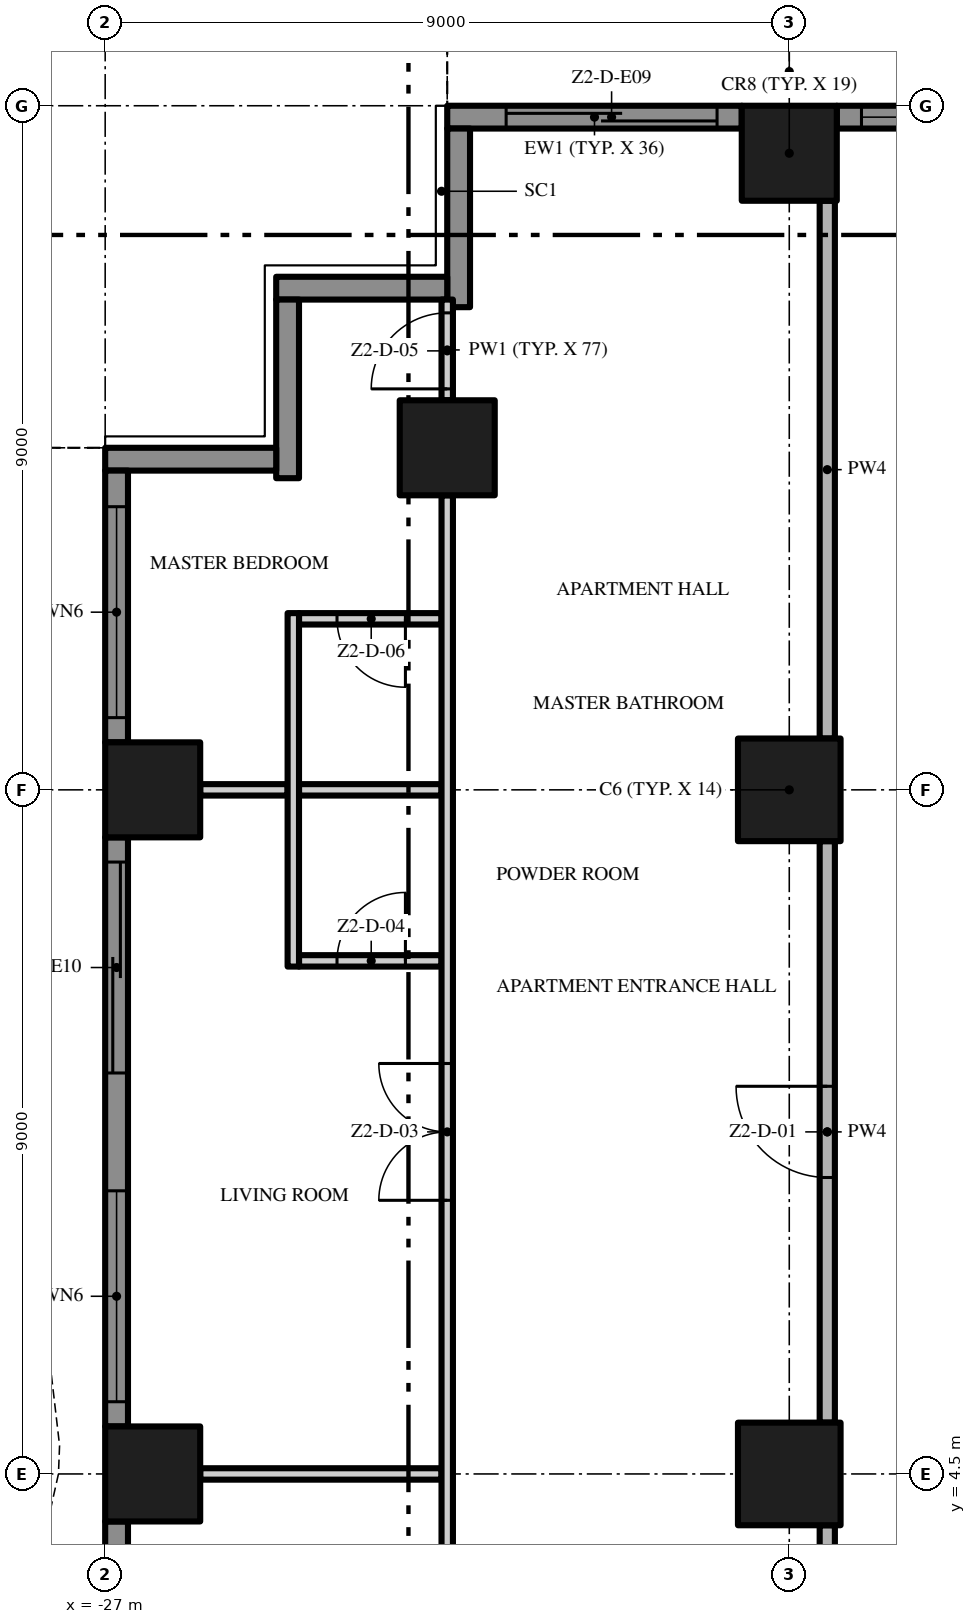
"""IFC4 building model, lengths in metres.
Left out: names, types, materials, properties, quantities, classifications, styles, units other than length and angle.
Written with IfcOpenShell. Run it as: python <this file> out.ifc"""

import sys

from ifc_helpers import new_model, si_unit, direction, frame, frame_2d, origin, origin_2d, place, context, subcontext, project, spatial, polyline, rectangle, outline, extrude, element, fill, save


model = new_model("IFC4")
c1 = context("Model", 3, precision=1e-05, world=origin(), true_north=direction((0.0, 1.0)))
c2 = subcontext(c1, "Body", "Model", "MODEL_VIEW")
j1 = project(units=[si_unit("LENGTHUNIT", "METRE"), si_unit("PLANEANGLEUNIT", "RADIAN")], contexts=[c1])
p1 = place(None, origin())
s1 = spatial("IfcSite", under=j1, at=p1, CompositionType="ELEMENT")
p2 = place(p1, origin())
s2 = spatial("IfcBuilding", under=s1, at=p2, CompositionType="ELEMENT")
p3 = place(p2, frame((0.0, 0.0, 103.6)))
s3 = spatial("IfcBuildingStorey", under=s2, at=p3, CompositionType="ELEMENT", Elevation=103.6)
p4 = place(p3, frame((-18.0, 13.5, 0.0), z_axis=(0.0, 0.0, 1.0), x_axis=(1.0, 0.0, 0.0)))
e1 = element("IfcColumn", 1, at=p4, inside=s3, PredefinedType="COLUMN", context=c2, shape_type="SweptSolid", body=[
    extrude(rectangle(XDim=1.35, YDim=1.35, at=origin_2d()), origin(), (0.0, 0.0, 1.0), 3.5),
])
p5 = place(p3, frame((-18.0, 21.875, 0.0), z_axis=(0.0, 0.0, 1.0), x_axis=(1.0, 0.0, 0.0)))
e2 = element("IfcColumn", 2, at=p5, inside=s3, PredefinedType="COLUMN", context=c2, shape_type="SweptSolid", body=[
    extrude(rectangle(XDim=1.25, YDim=1.25, at=origin_2d()), origin(), (0.0, 0.0, 1.0), 3.5),
])
p6 = place(p3, frame((-18.0, 4.5, 0.0), z_axis=(0.0, 0.0, 1.0), x_axis=(1.0, 0.0, 0.0)))
e3 = element("IfcColumn", 3, at=p6, inside=s3, PredefinedType="COLUMN", context=c2, shape_type="SweptSolid", body=[
    extrude(rectangle(XDim=1.35, YDim=1.35, at=origin_2d()), origin(), (0.0, 0.0, 1.0), 3.5),
])
for number, where, z_axis, x_axis in (
    (4, (-26.375, 13.5, 0.0), (0.0, 0.0, 1.0), (1.0, 0.0, 0.0)),
    (5, (-22.5, 18.0, 0.0), (0.0, 0.0, 1.0), (1.0, 0.0, 0.0)),
    (6, (-26.375, 4.5, 0.0), (0.0, 0.0, 1.0), (1.0, 0.0, 0.0)),
):
    element("IfcColumn", number, at=place(p3, frame(where, z_axis=z_axis, x_axis=x_axis)), inside=s3, PredefinedType="COLUMN", context=c2, shape_type="SweptSolid", body=[
        extrude(rectangle(XDim=1.25, YDim=1.25, at=origin_2d()), origin(), (0.0, 0.0, 1.0), 3.5),
    ])
p7 = place(p3, frame((-17.375, 22.35, 0.0), z_axis=(0.0, 0.0, 1.0), x_axis=(1.0, 0.0, 0.0)))
e7 = element("IfcWall", 7, at=p7, inside=s3, PredefinedType="SOLIDWALL", context=c2, shape_type="SweptSolid", body=[
    extrude(rectangle(XDim=3.875, YDim=0.3, at=frame_2d((1.938, 0.0))), origin(), (0.0, 0.0, 1.0), 3.5),
])
p8 = place(p7, frame((0.325, 0.0, 0.45)))
e8 = element("IfcOpeningElement", 8, at=p8, cuts=e7, PredefinedType="OPENING", context=c2, shape_type="SweptSolid", body=[
    extrude(rectangle(XDim=2.775, YDim=2.65, at=frame_2d((1.387, 1.325))), frame((0.0, 0.16, 0.0), z_axis=(0.0, -1.0, 0.0), x_axis=(1.0, 0.0, 0.0)), (0.0, 0.0, 1.0), 0.32),
])
p9 = place(p3, frame((-22.5, 22.35, 0.0), z_axis=(0.0, 0.0, 1.0), x_axis=(1.0, 0.0, 0.0)))
e9 = element("IfcWall", 9, at=p9, inside=s3, PredefinedType="SOLIDWALL", context=c2, shape_type="SweptSolid", body=[
    extrude(rectangle(XDim=3.875, YDim=0.3, at=frame_2d((1.938, 0.0))), origin(), (0.0, 0.0, 1.0), 3.5),
])
p10 = place(p9, frame((0.775, 0.0, 0.0)))
e10 = element("IfcOpeningElement", 10, at=p10, cuts=e9, PredefinedType="OPENING", context=c2, shape_type="SweptSolid", body=[
    extrude(rectangle(XDim=2.775, YDim=2.4, at=frame_2d((1.387, 1.2))), frame((0.0, 0.16, 0.0), z_axis=(0.0, -1.0, 0.0), x_axis=(1.0, 0.0, 0.0)), (0.0, 0.0, 1.0), 0.32),
])
p11 = place(p3, frame((-22.35, 19.85, 0.0), z_axis=(0.0, 0.0, 1.0), x_axis=(0.0, 1.0, 0.0)))
e11 = element("IfcWall", 11, at=p11, inside=s3, PredefinedType="SOLIDWALL", context=c2, shape_type="SweptSolid", body=[
    extrude(rectangle(XDim=2.35, YDim=0.3, at=frame_2d((1.175, 0.0))), origin(), (0.0, 0.0, 1.0), 3.5),
])
p12 = place(p3, frame((-24.75, 20.1, 0.0), z_axis=(0.0, 0.0, 1.0), x_axis=(1.0, 0.0, 0.0)))
e12 = element("IfcWall", 12, at=p12, inside=s3, PredefinedType="SOLIDWALL", context=c2, shape_type="SweptSolid", body=[
    extrude(rectangle(XDim=2.25, YDim=0.3, at=frame_2d((1.125, 0.0))), origin(), (0.0, 0.0, 1.0), 3.5),
])
p13 = place(p3, frame((-24.6, 17.6, 0.0), z_axis=(0.0, 0.0, 1.0), x_axis=(0.0, 1.0, 0.0)))
e13 = element("IfcWall", 13, at=p13, inside=s3, PredefinedType="SOLIDWALL", context=c2, shape_type="SweptSolid", body=[
    extrude(rectangle(XDim=2.35, YDim=0.3, at=frame_2d((1.175, 0.0))), origin(), (0.0, 0.0, 1.0), 3.5),
])
p14 = place(p3, frame((-27.0, 17.85, 0.0), z_axis=(0.0, 0.0, 1.0), x_axis=(1.0, 0.0, 0.0)))
e14 = element("IfcWall", 14, at=p14, inside=s3, PredefinedType="SOLIDWALL", context=c2, shape_type="SweptSolid", body=[
    extrude(rectangle(XDim=2.25, YDim=0.3, at=frame_2d((1.125, 0.0))), origin(), (0.0, 0.0, 1.0), 3.5),
])
p15 = place(p3, frame((-26.85, 14.125, 0.0), z_axis=(0.0, 0.0, 1.0), x_axis=(0.0, 1.0, 0.0)))
e15 = element("IfcWall", 15, at=p15, inside=s3, PredefinedType="SOLIDWALL", context=c2, shape_type="SweptSolid", body=[
    extrude(rectangle(XDim=3.575, YDim=0.3, at=frame_2d((1.788, 0.0))), origin(), (0.0, 0.0, 1.0), 3.5),
])
p16 = place(p15, frame((0.325, 0.0, 0.45)))
e16 = element("IfcOpeningElement", 16, at=p16, cuts=e15, PredefinedType="OPENING", context=c2, shape_type="SweptSolid", body=[
    extrude(rectangle(XDim=2.775, YDim=2.65, at=frame_2d((1.387, 1.325))), frame((0.0, 0.16, 0.0), z_axis=(0.0, -1.0, 0.0), x_axis=(1.0, 0.0, 0.0)), (0.0, 0.0, 1.0), 0.32),
])
p17 = place(p3, frame((-26.85, 5.125, 0.0), z_axis=(0.0, 0.0, 1.0), x_axis=(0.0, 1.0, 0.0)))
e17 = element("IfcWall", 17, at=p17, inside=s3, PredefinedType="SOLIDWALL", context=c2, shape_type="SweptSolid", body=[
    extrude(rectangle(XDim=7.75, YDim=0.3, at=frame_2d((3.875, 0.0))), origin(), (0.0, 0.0, 1.0), 3.5),
])
p18 = place(p17, frame((4.65, 0.0, 0.0)))
e18 = element("IfcOpeningElement", 18, at=p18, cuts=e17, PredefinedType="OPENING", context=c2, shape_type="SweptSolid", body=[
    extrude(rectangle(XDim=2.775, YDim=2.4, at=frame_2d((1.387, 1.2))), frame((0.0, 0.16, 0.0), z_axis=(0.0, -1.0, 0.0), x_axis=(1.0, 0.0, 0.0)), (0.0, 0.0, 1.0), 0.32),
])
p19 = place(p17, frame((0.325, 0.0, 0.45)))
e19 = element("IfcOpeningElement", 19, at=p19, cuts=e17, PredefinedType="OPENING", context=c2, shape_type="SweptSolid", body=[
    extrude(rectangle(XDim=2.775, YDim=2.65, at=frame_2d((1.387, 1.325))), frame((0.0, 0.16, 0.0), z_axis=(0.0, -1.0, 0.0), x_axis=(1.0, 0.0, 0.0)), (0.0, 0.0, 1.0), 0.32),
])
p20 = place(p3, frame((-26.85, -3.875, 0.0), z_axis=(0.0, 0.0, 1.0), x_axis=(0.0, 1.0, 0.0)))
e20 = element("IfcWall", 20, at=p20, inside=s3, PredefinedType="SOLIDWALL", context=c2, shape_type="SweptSolid", body=[
    extrude(rectangle(XDim=7.75, YDim=0.3, at=frame_2d((3.875, 0.0))), origin(), (0.0, 0.0, 1.0), 3.5),
])
p21 = place(p20, frame((4.65, 0.0, 0.45)))
e21 = element("IfcOpeningElement", 21, at=p21, cuts=e20, PredefinedType="OPENING", context=c2, shape_type="SweptSolid", body=[
    extrude(rectangle(XDim=2.775, YDim=2.65, at=frame_2d((1.387, 1.325))), frame((0.0, 0.16, 0.0), z_axis=(0.0, -1.0, 0.0), x_axis=(1.0, 0.0, 0.0)), (0.0, 0.0, 1.0), 0.32),
])
p22 = place(p20, frame((0.325, 0.0, 0.0)))
e22 = element("IfcOpeningElement", 22, at=p22, cuts=e20, PredefinedType="OPENING", context=c2, shape_type="SweptSolid", body=[
    extrude(rectangle(XDim=2.775, YDim=2.4, at=frame_2d((1.387, 1.2))), frame((0.0, 0.16, 0.0), z_axis=(0.0, -1.0, 0.0), x_axis=(1.0, 0.0, 0.0)), (0.0, 0.0, 1.0), 0.32),
])
p23 = place(p3, origin())
e23 = element("IfcWall", 23, at=p23, inside=s3, PredefinedType="USERDEFINED", context=c2, shape_type="SweptSolid", body=[
    extrude(outline(polyline([(-27.951, 18.0), (-28.612, 16.5), (-29.345, 15.0), (-29.869, 13.5), (-30.0, 12.375), (-29.985, 12.0), (-29.649, 10.5), (-28.988, 9.0), (-28.255, 7.5), (-27.731, 6.0), (-27.6, 4.875), (-27.615, 4.5), (-27.951, 3.0), (-28.612, 1.5), (-29.345, 0.0), (-29.869, -1.5), (-30.0, -2.625), (-29.985, -3.0), (-29.649, -4.5), (-28.988, -6.0), (-28.255, -7.5), (-27.731, -9.0), (-27.6, -10.125), (-27.615, -10.5), (-27.951, -12.0), (-28.612, -13.5), (-29.345, -15.0), (-29.869, -16.5), (-30.0, -17.625), (-29.985, -18.0), (-29.735, -17.99), (-29.749, -17.635), (-29.624, -16.556), (-29.114, -15.096), (-28.385, -13.605), (-27.713, -12.079), (-27.366, -10.533), (-27.349, -10.115), (-27.486, -8.944), (-28.024, -7.404), (-28.761, -5.895), (-29.41, -4.421), (-29.736, -2.967), (-29.749, -2.635), (-29.624, -1.556), (-29.114, -0.096), (-28.385, 1.395), (-27.713, 2.921), (-27.366, 4.467), (-27.349, 4.885), (-27.486, 6.056), (-28.024, 7.596), (-28.761, 9.105), (-29.41, 10.579), (-29.736, 12.033), (-29.749, 12.365), (-29.624, 13.444), (-29.114, 14.904), (-28.385, 16.395), (-27.723, 17.899), (-27.951, 18.0)])), origin(), (0.0, 0.0, 1.0), 0.9),
])
p24 = place(p3, frame((-25.75, 4.5, 0.0), z_axis=(0.0, 0.0, 1.0), x_axis=(1.0, 0.0, 0.0)))
e24 = element("IfcWall", 24, at=p24, inside=s3, PredefinedType="PARTITIONING", context=c2, shape_type="SweptSolid", body=[
    extrude(rectangle(XDim=3.175, YDim=0.15, at=frame_2d((1.587, 0.0))), origin(), (0.0, 0.0, 1.0), 3.5),
])
p25 = place(p3, frame((-24.45, 11.25, 0.0), z_axis=(0.0, 0.0, 1.0), x_axis=(1.0, 0.0, 0.0)))
e25 = element("IfcWall", 25, at=p25, inside=s3, PredefinedType="PARTITIONING", context=c2, shape_type="SweptSolid", body=[
    extrude(rectangle(XDim=1.875, YDim=0.15, at=frame_2d((0.938, 0.0))), origin(), (0.0, 0.0, 1.0), 3.5),
])
p26 = place(p25, frame((0.5, 0.0, 0.0)))
e26 = element("IfcOpeningElement", 26, at=p26, cuts=e25, PredefinedType="OPENING", context=c2, shape_type="SweptSolid", body=[
    extrude(rectangle(XDim=0.9, YDim=2.1, at=frame_2d((0.45, 1.05))), frame((0.0, 0.085, 0.0), z_axis=(0.0, -1.0, 0.0), x_axis=(1.0, 0.0, 0.0)), (0.0, 0.0, 1.0), 0.17),
])
p27 = place(p3, frame((-25.75, 13.5, 0.0), z_axis=(0.0, 0.0, 1.0), x_axis=(1.0, 0.0, 0.0)))
e27 = element("IfcWall", 27, at=p27, inside=s3, PredefinedType="PARTITIONING", context=c2, shape_type="SweptSolid", body=[
    extrude(rectangle(XDim=1.15, YDim=0.15, at=frame_2d((0.575, 0.0))), origin(), (0.0, 0.0, 1.0), 3.5),
])
p28 = place(p3, frame((-24.45, 13.5, 0.0), z_axis=(0.0, 0.0, 1.0), x_axis=(1.0, 0.0, 0.0)))
e28 = element("IfcWall", 28, at=p28, inside=s3, PredefinedType="PARTITIONING", context=c2, shape_type="SweptSolid", body=[
    extrude(rectangle(XDim=1.875, YDim=0.15, at=frame_2d((0.938, 0.0))), origin(), (0.0, 0.0, 1.0), 3.5),
])
p29 = place(p3, frame((-22.575, 15.75, 0.0), z_axis=(0.0, 0.0, 1.0), x_axis=(-1.0, 0.0, 0.0)))
e29 = element("IfcWall", 29, at=p29, inside=s3, PredefinedType="PARTITIONING", context=c2, shape_type="SweptSolid", body=[
    extrude(rectangle(XDim=1.875, YDim=0.15, at=frame_2d((0.938, 0.0))), origin(), (0.0, 0.0, 1.0), 3.5),
])
p30 = place(p29, frame((0.475, 0.0, 0.0)))
e30 = element("IfcOpeningElement", 30, at=p30, cuts=e29, PredefinedType="OPENING", context=c2, shape_type="SweptSolid", body=[
    extrude(rectangle(XDim=0.9, YDim=2.1, at=frame_2d((0.45, 1.05))), frame((0.0, 0.085, 0.0), z_axis=(0.0, -1.0, 0.0), x_axis=(1.0, 0.0, 0.0)), (0.0, 0.0, 1.0), 0.17),
])
p31 = place(p3, frame((-24.525, 11.175, 0.0), z_axis=(0.0, 0.0, 1.0), x_axis=(0.0, 1.0, 0.0)))
e31 = element("IfcWall", 31, at=p31, inside=s3, PredefinedType="PARTITIONING", context=c2, shape_type="SweptSolid", body=[
    extrude(rectangle(XDim=4.65, YDim=0.15, at=frame_2d((2.325, 0.0))), origin(), (0.0, 0.0, 1.0), 3.5),
])
p32 = place(p3, frame((-22.5, 0.1, 0.0), z_axis=(0.0, 0.0, 1.0), x_axis=(0.0, 1.0, 0.0)))
e32 = element("IfcWall", 32, at=p32, inside=s3, PredefinedType="PARTITIONING", context=c2, shape_type="SweptSolid", body=[
    extrude(rectangle(XDim=17.275, YDim=0.15, at=frame_2d((8.637, 0.0))), origin(), (0.0, 0.0, 1.0), 3.5),
])
p33 = place(p32, frame((1.65, 0.0, 0.0)))
e33 = element("IfcOpeningElement", 33, at=p33, cuts=e32, PredefinedType="OPENING", context=c2, shape_type="SweptSolid", body=[
    extrude(rectangle(XDim=1.0, YDim=2.4, at=frame_2d((0.5, 1.2))), frame((0.0, 0.085, 0.0), z_axis=(0.0, -1.0, 0.0), x_axis=(1.0, 0.0, 0.0)), (0.0, 0.0, 1.0), 0.17),
])
p34 = place(p32, frame((8.0, 0.0, 0.0)))
e34 = element("IfcOpeningElement", 34, at=p34, cuts=e32, PredefinedType="OPENING", context=c2, shape_type="SweptSolid", body=[
    extrude(rectangle(XDim=1.8, YDim=2.4, at=frame_2d((0.9, 1.2))), frame((0.0, 0.085, 0.0), z_axis=(0.0, -1.0, 0.0), x_axis=(1.0, 0.0, 0.0)), (0.0, 0.0, 1.0), 0.17),
])
p35 = place(p3, frame((-22.5, 18.625, 0.0), z_axis=(0.0, 0.0, 1.0), x_axis=(0.0, 1.0, 0.0)))
e35 = element("IfcWall", 35, at=p35, inside=s3, PredefinedType="PARTITIONING", context=c2, shape_type="SweptSolid", body=[
    extrude(rectangle(XDim=1.325, YDim=0.15, at=frame_2d((0.662, 0.0))), origin(), (0.0, 0.0, 1.0), 3.5),
])
p36 = place(p35, frame((0.15, 0.0, 0.0)))
e36 = element("IfcOpeningElement", 36, at=p36, cuts=e35, PredefinedType="OPENING", context=c2, shape_type="SweptSolid", body=[
    extrude(rectangle(XDim=1.0, YDim=2.4, at=frame_2d((0.5, 1.2))), frame((0.0, 0.085, 0.0), z_axis=(0.0, -1.0, 0.0), x_axis=(1.0, 0.0, 0.0)), (0.0, 0.0, 1.0), 0.17),
])
p37 = place(p3, frame((-17.5, -0.2, 0.0), z_axis=(0.0, 0.0, 1.0), x_axis=(0.0, 1.0, 0.0)))
e37 = element("IfcWall", 37, at=p37, inside=s3, PredefinedType="PARTITIONING", context=c2, shape_type="SweptSolid", body=[
    extrude(rectangle(XDim=4.025, YDim=0.2, at=frame_2d((2.013, 0.0))), origin(), (0.0, 0.0, 1.0), 3.5),
])
p38 = place(p3, frame((-17.5, 5.175, 0.0), z_axis=(0.0, 0.0, 1.0), x_axis=(0.0, 1.0, 0.0)))
e38 = element("IfcWall", 38, at=p38, inside=s3, PredefinedType="PARTITIONING", context=c2, shape_type="SweptSolid", body=[
    extrude(rectangle(XDim=7.65, YDim=0.2, at=frame_2d((3.825, 0.0))), origin(), (0.0, 0.0, 1.0), 3.5),
])
p39 = place(p38, frame((3.225, 0.0, 0.0)))
e39 = element("IfcOpeningElement", 39, at=p39, cuts=e38, PredefinedType="OPENING", context=c2, shape_type="SweptSolid", body=[
    extrude(rectangle(XDim=1.2, YDim=2.4, at=frame_2d((0.6, 1.2))), frame((0.0, 0.11, 0.0), z_axis=(0.0, -1.0, 0.0), x_axis=(1.0, 0.0, 0.0)), (0.0, 0.0, 1.0), 0.22),
])
p40 = place(p3, frame((-17.5, 14.175, 0.0), z_axis=(0.0, 0.0, 1.0), x_axis=(0.0, 1.0, 0.0)))
e40 = element("IfcWall", 40, at=p40, inside=s3, PredefinedType="PARTITIONING", context=c2, shape_type="SweptSolid", body=[
    extrude(rectangle(XDim=7.075, YDim=0.2, at=frame_2d((3.538, 0.0))), origin(), (0.0, 0.0, 1.0), 3.5),
])
p41 = place(p8, origin())
e41 = element("IfcWindow", 41, at=p41, inside=s3, PartitioningType="SINGLE_PANEL", PredefinedType="WINDOW", context=c2, shape_type="SweptSolid", body=[
    extrude(rectangle(XDim=2.775, YDim=2.65, at=frame_2d((1.387, 1.325))), frame((0.0, 0.03, 0.0), z_axis=(0.0, -1.0, 0.0), x_axis=(1.0, 0.0, 0.0)), (0.0, 0.0, 1.0), 0.06),
])
fill(e8, e41)
p42 = place(p10, origin())
e42 = element("IfcDoor", 42, at=p42, inside=s3, OperationType="SINGLE_SWING_LEFT", PredefinedType="DOOR", context=c2, shape_type="SweptSolid", body=[
    extrude(rectangle(XDim=2.775, YDim=2.4, at=frame_2d((1.387, 1.2))), frame((0.0, 0.025, 0.0), z_axis=(0.0, -1.0, 0.0), x_axis=(1.0, 0.0, 0.0)), (0.0, 0.0, 1.0), 0.05),
])
fill(e10, e42)
p43 = place(p16, origin())
e43 = element("IfcWindow", 43, at=p43, inside=s3, PartitioningType="SINGLE_PANEL", PredefinedType="WINDOW", context=c2, shape_type="SweptSolid", body=[
    extrude(rectangle(XDim=2.775, YDim=2.65, at=frame_2d((1.387, 1.325))), frame((0.0, 0.03, 0.0), z_axis=(0.0, -1.0, 0.0), x_axis=(1.0, 0.0, 0.0)), (0.0, 0.0, 1.0), 0.06),
])
fill(e16, e43)
p44 = place(p18, origin())
e44 = element("IfcDoor", 44, at=p44, inside=s3, OperationType="SINGLE_SWING_LEFT", PredefinedType="DOOR", context=c2, shape_type="SweptSolid", body=[
    extrude(rectangle(XDim=2.775, YDim=2.4, at=frame_2d((1.387, 1.2))), frame((0.0, 0.025, 0.0), z_axis=(0.0, -1.0, 0.0), x_axis=(1.0, 0.0, 0.0)), (0.0, 0.0, 1.0), 0.05),
])
fill(e18, e44)
p45 = place(p19, origin())
e45 = element("IfcWindow", 45, at=p45, inside=s3, PartitioningType="SINGLE_PANEL", PredefinedType="WINDOW", context=c2, shape_type="SweptSolid", body=[
    extrude(rectangle(XDim=2.775, YDim=2.65, at=frame_2d((1.387, 1.325))), frame((0.0, 0.03, 0.0), z_axis=(0.0, -1.0, 0.0), x_axis=(1.0, 0.0, 0.0)), (0.0, 0.0, 1.0), 0.06),
])
fill(e19, e45)
p46 = place(p39, origin())
e46 = element("IfcDoor", 46, at=p46, inside=s3, OperationType="SINGLE_SWING_RIGHT", PredefinedType="DOOR", context=c2, shape_type="SweptSolid", body=[
    extrude(rectangle(XDim=1.2, YDim=2.4, at=frame_2d((0.6, 1.2))), frame((0.0, 0.025, 0.0), z_axis=(0.0, -1.0, 0.0), x_axis=(1.0, 0.0, 0.0)), (0.0, 0.0, 1.0), 0.05),
])
fill(e39, e46)
p47 = place(p34, origin())
e47 = element("IfcDoor", 47, at=p47, inside=s3, OperationType="DOUBLE_DOOR_SINGLE_SWING", PredefinedType="DOOR", context=c2, shape_type="SweptSolid", body=[
    extrude(rectangle(XDim=1.8, YDim=2.4, at=frame_2d((0.9, 1.2))), frame((0.0, 0.025, 0.0), z_axis=(0.0, -1.0, 0.0), x_axis=(1.0, 0.0, 0.0)), (0.0, 0.0, 1.0), 0.05),
])
fill(e34, e47)
p48 = place(p26, origin())
e48 = element("IfcDoor", 48, at=p48, inside=s3, OperationType="SINGLE_SWING_RIGHT", PredefinedType="DOOR", context=c2, shape_type="SweptSolid", body=[
    extrude(rectangle(XDim=0.9, YDim=2.1, at=frame_2d((0.45, 1.05))), frame((0.0, 0.025, 0.0), z_axis=(0.0, -1.0, 0.0), x_axis=(1.0, 0.0, 0.0)), (0.0, 0.0, 1.0), 0.05),
])
fill(e26, e48)
p49 = place(p36, origin())
e49 = element("IfcDoor", 49, at=p49, inside=s3, OperationType="SINGLE_SWING_LEFT", PredefinedType="DOOR", context=c2, shape_type="SweptSolid", body=[
    extrude(rectangle(XDim=1.0, YDim=2.4, at=frame_2d((0.5, 1.2))), frame((0.0, 0.025, 0.0), z_axis=(0.0, -1.0, 0.0), x_axis=(1.0, 0.0, 0.0)), (0.0, 0.0, 1.0), 0.05),
])
fill(e36, e49)
p50 = place(p30, origin())
e50 = element("IfcDoor", 50, at=p50, inside=s3, OperationType="SINGLE_SWING_LEFT", PredefinedType="DOOR", context=c2, shape_type="SweptSolid", body=[
    extrude(rectangle(XDim=0.9, YDim=2.1, at=frame_2d((0.45, 1.05))), frame((0.0, 0.025, 0.0), z_axis=(0.0, -1.0, 0.0), x_axis=(1.0, 0.0, 0.0)), (0.0, 0.0, 1.0), 0.05),
])
fill(e30, e50)
save(model, sys.argv[1])
